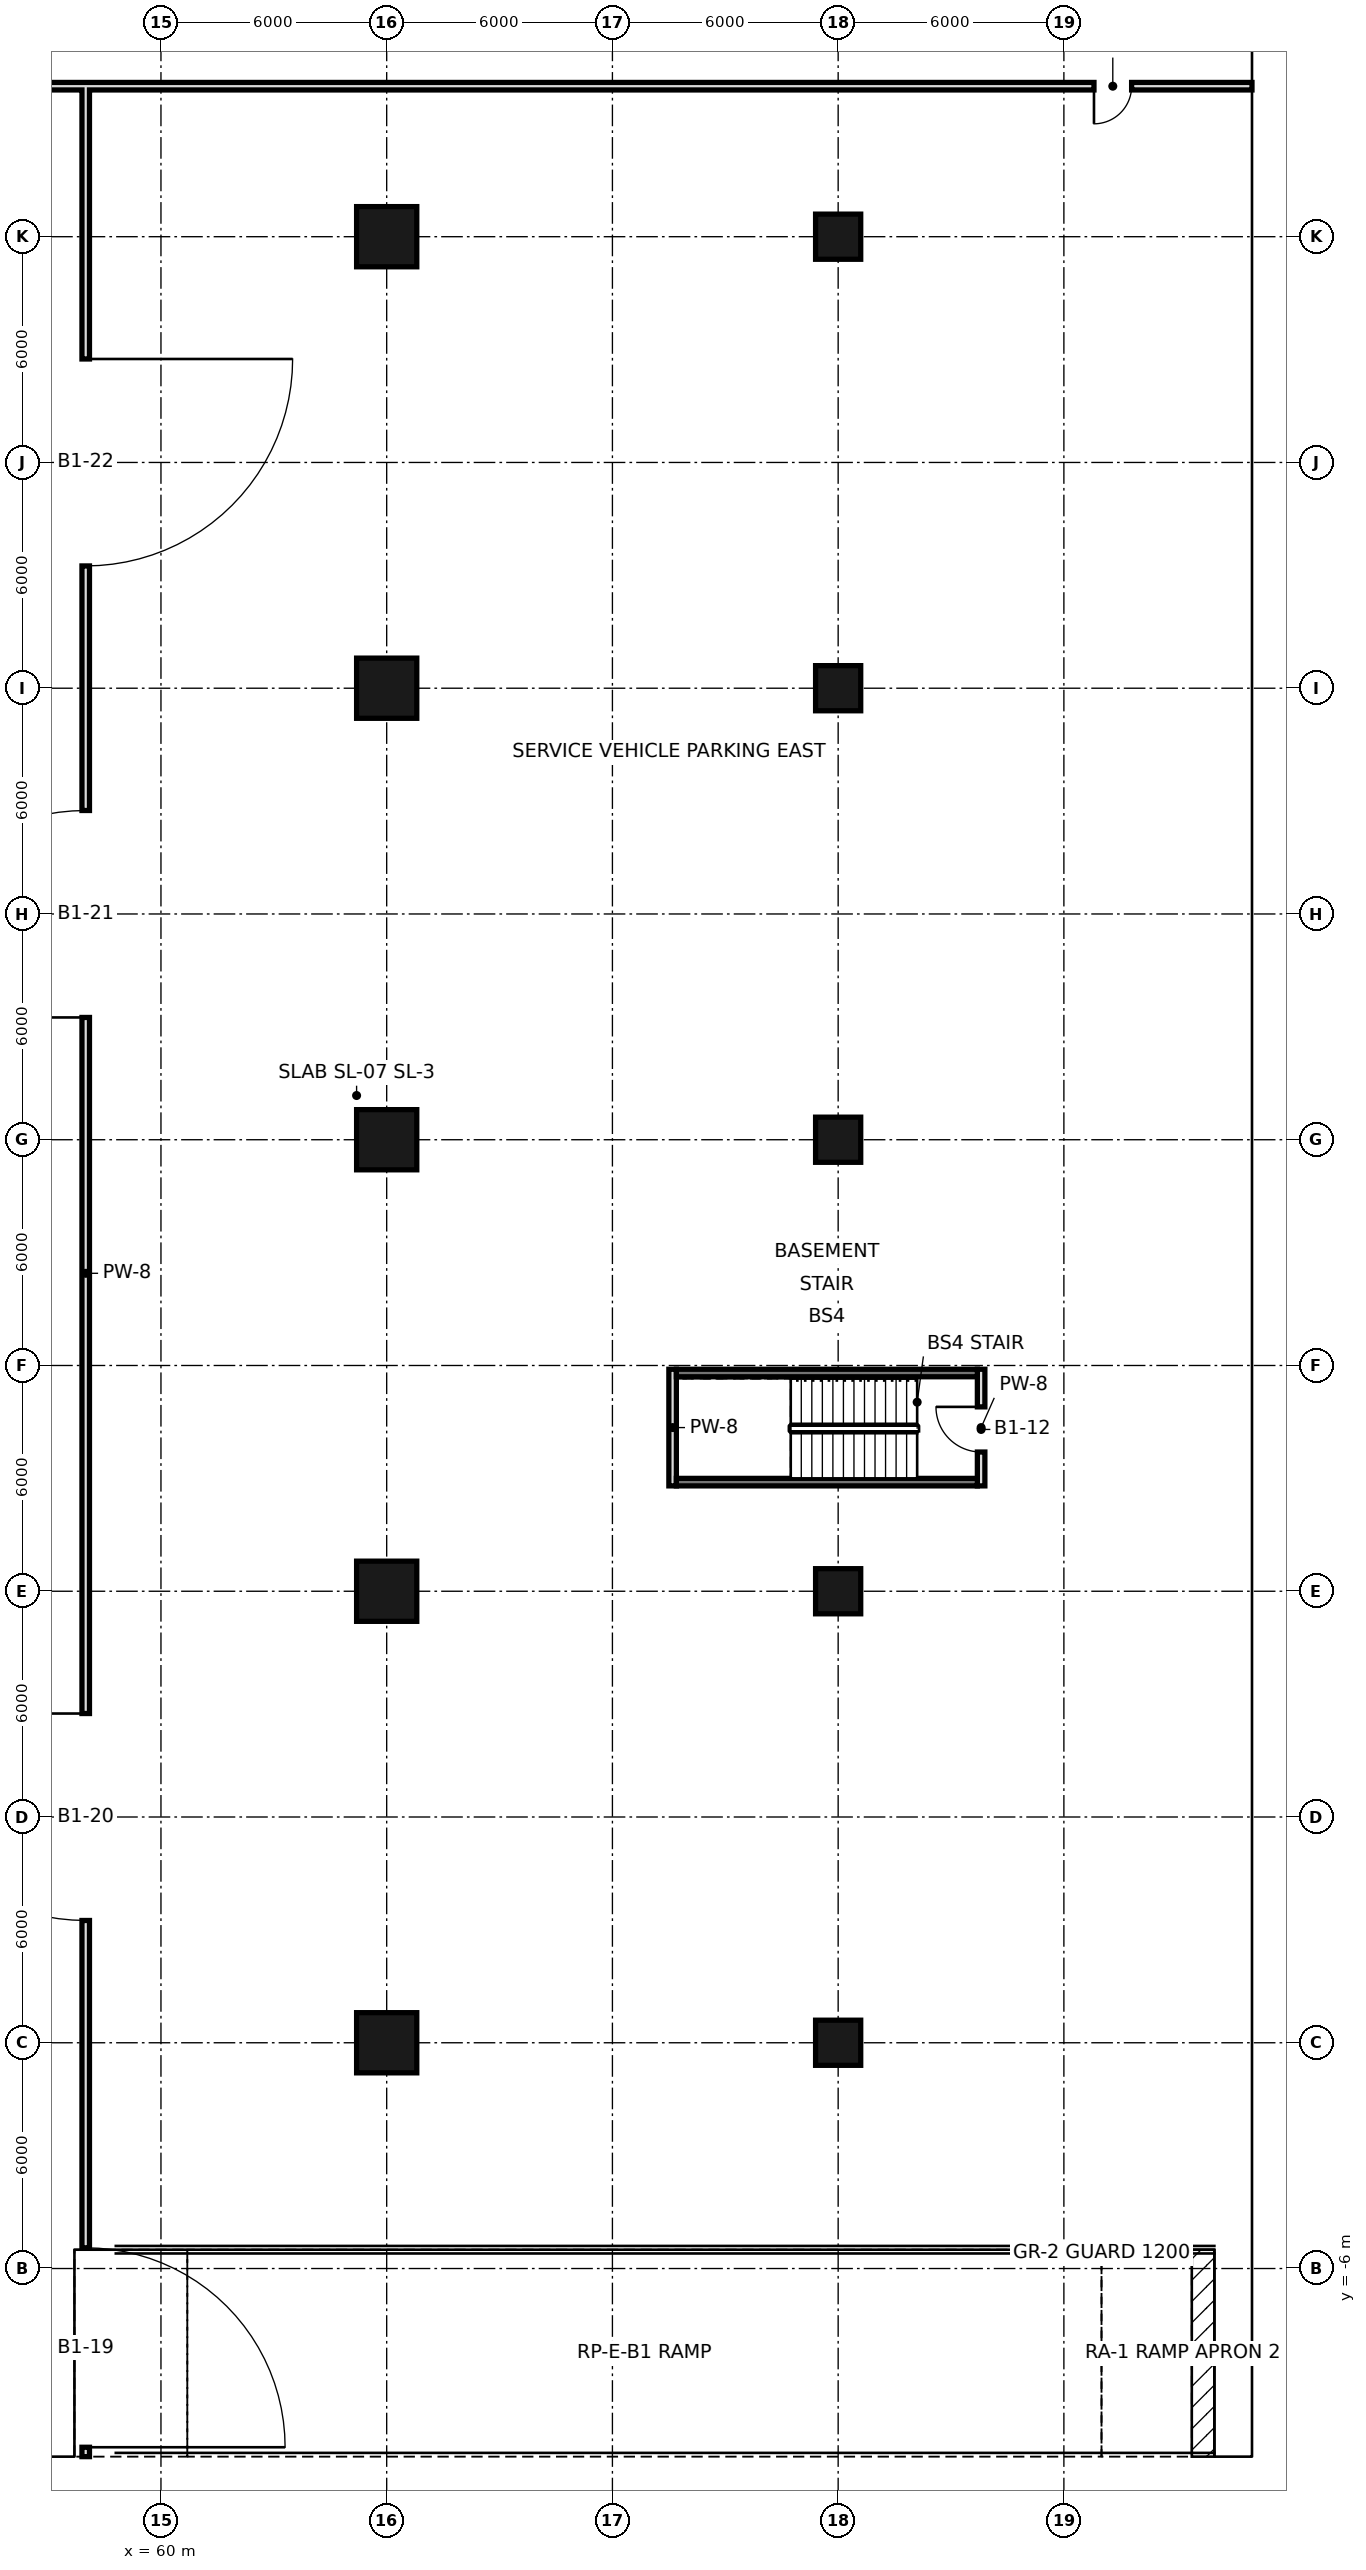
"""IFC4 building model, lengths in metres.
Left out: names, types, materials, properties, quantities, classifications, styles, units other than length and angle.
Written with IfcOpenShell. Run it as: python <this file> out.ifc"""

import sys

from ifc_helpers import new_model, si_unit, direction, frame, frame_2d, origin, origin_2d, place, context, subcontext, project, spatial, rectangle, extrude, element, fill, save


model = new_model("IFC4")
c1 = context("Model", 3, precision=1e-05, world=origin(), true_north=direction((0.0, 1.0)))
c2 = subcontext(c1, "Body", "Model", "MODEL_VIEW")
j1 = project(units=[si_unit("LENGTHUNIT", "METRE"), si_unit("PLANEANGLEUNIT", "RADIAN")], contexts=[c1])
p1 = place(None, origin())
s1 = spatial("IfcSite", under=j1, at=p1, CompositionType="ELEMENT")
p2 = place(p1, origin())
s2 = spatial("IfcBuilding", under=s1, at=p2, CompositionType="ELEMENT")
p3 = place(p2, frame((0.0, 0.0, -13.5)))
s3 = spatial("IfcBuildingStorey", under=s2, at=p3, CompositionType="ELEMENT", Elevation=-13.5)
p4 = place(p3, frame((89.5, -12.0, -26.5), z_axis=(0.0, 0.0, 1.0), x_axis=(0.0, 1.0, 0.0)))
e1 = element("IfcWall", 1, at=p4, inside=s3, PredefinedType="SOLIDWALL", context=c2, shape_type="SweptSolid", body=[
    extrude(rectangle(XDim=72.0, YDim=1.0, at=frame_2d((36.0, 0.0))), origin(), (0.0, 0.0, 1.0), 39.64),
])
p5 = place(p3, frame((-23.0, -11.5, -26.5), z_axis=(0.0, 0.0, 1.0), x_axis=(1.0, 0.0, 0.0)))
e2 = element("IfcWall", 2, at=p5, inside=s3, PredefinedType="SOLIDWALL", context=c2, shape_type="SweptSolid", body=[
    extrude(rectangle(XDim=112.0, YDim=1.0, at=frame_2d((56.0, 0.0))), origin(), (0.0, 0.0, 1.0), 39.64),
])
p6 = place(p2, frame((0.0, 0.0, -4.5)))
s4 = spatial("IfcBuildingStorey", under=s2, at=p6, CompositionType="ELEMENT", Elevation=-4.5)
for number, where, z_axis, x_axis in (
    (3, (66.0, 0.0, 0.0), (0.0, 0.0, 1.0), (1.0, 0.0, 0.0)),
    (4, (66.0, 12.0, 0.0), (0.0, 0.0, 1.0), (1.0, 0.0, 0.0)),
    (5, (66.0, 24.0, 0.0), (0.0, 0.0, 1.0), (1.0, 0.0, 0.0)),
    (6, (66.0, 36.0, 0.0), (0.0, 0.0, 1.0), (1.0, 0.0, 0.0)),
    (7, (66.0, 48.0, 0.0), (0.0, 0.0, 1.0), (1.0, 0.0, 0.0)),
):
    element("IfcColumn", number, at=place(p6, frame(where, z_axis=z_axis, x_axis=x_axis)), inside=s4, PredefinedType="COLUMN", context=c2, shape_type="SweptSolid", body=[
        extrude(rectangle(XDim=1.6, YDim=1.6, at=origin_2d()), origin(), (0.0, 0.0, 1.0), 4.5),
    ])
for number, where, z_axis, x_axis in (
    (8, (78.0, 0.0, 0.0), (0.0, 0.0, 1.0), (1.0, 0.0, 0.0)),
    (9, (78.0, 12.0, 0.0), (0.0, 0.0, 1.0), (1.0, 0.0, 0.0)),
    (10, (78.0, 24.0, 0.0), (0.0, 0.0, 1.0), (1.0, 0.0, 0.0)),
    (11, (78.0, 36.0, 0.0), (0.0, 0.0, 1.0), (1.0, 0.0, 0.0)),
    (12, (78.0, 48.0, 0.0), (0.0, 0.0, 1.0), (1.0, 0.0, 0.0)),
):
    element("IfcColumn", number, at=place(p6, frame(where, z_axis=z_axis, x_axis=x_axis)), inside=s4, PredefinedType="COLUMN", context=c2, shape_type="SweptSolid", body=[
        extrude(rectangle(XDim=1.2, YDim=1.2, at=origin_2d()), origin(), (0.0, 0.0, 1.0), 4.5),
    ])
p7 = place(p6, frame((58.0, -11.0, 0.0), z_axis=(0.0, 0.0, 1.0), x_axis=(0.0, 1.0, 0.0)))
e13 = element("IfcWall", 13, at=p7, inside=s4, PredefinedType="SOLIDWALL", context=c2, shape_type="SweptSolid", body=[
    extrude(rectangle(XDim=62.9, YDim=0.2, at=frame_2d((31.45, 0.0))), origin(), (0.0, 0.0, 1.0), 3.04),
])
p8 = place(p7, frame((0.25, 0.0, 0.0)))
e14 = element("IfcOpeningElement", 14, at=p8, cuts=e13, PredefinedType="OPENING", context=c2, shape_type="SweptSolid", body=[
    extrude(rectangle(XDim=5.3, YDim=2.4, at=frame_2d((2.65, 1.2))), frame((0.0, 0.11, 0.0), z_axis=(0.0, -1.0, 0.0), x_axis=(1.0, 0.0, 0.0)), (0.0, 0.0, 1.0), 0.22),
])
p9 = place(p7, frame((14.25, 0.0, 0.0)))
e15 = element("IfcOpeningElement", 15, at=p9, cuts=e13, PredefinedType="OPENING", context=c2, shape_type="SweptSolid", body=[
    extrude(rectangle(XDim=5.5, YDim=2.4, at=frame_2d((2.75, 1.2))), frame((0.0, 0.11, 0.0), z_axis=(0.0, -1.0, 0.0), x_axis=(1.0, 0.0, 0.0)), (0.0, 0.0, 1.0), 0.22),
])
p10 = place(p7, frame((38.25, 0.0, 0.0)))
e16 = element("IfcOpeningElement", 16, at=p10, cuts=e13, PredefinedType="OPENING", context=c2, shape_type="SweptSolid", body=[
    extrude(rectangle(XDim=5.5, YDim=2.4, at=frame_2d((2.75, 1.2))), frame((0.0, 0.11, 0.0), z_axis=(0.0, -1.0, 0.0), x_axis=(1.0, 0.0, 0.0)), (0.0, 0.0, 1.0), 0.22),
])
p11 = place(p7, frame((50.25, 0.0, 0.0)))
e17 = element("IfcOpeningElement", 17, at=p11, cuts=e13, PredefinedType="OPENING", context=c2, shape_type="SweptSolid", body=[
    extrude(rectangle(XDim=5.5, YDim=2.4, at=frame_2d((2.75, 1.2))), frame((0.0, 0.11, 0.0), z_axis=(0.0, -1.0, 0.0), x_axis=(1.0, 0.0, 0.0)), (0.0, 0.0, 1.0), 0.22),
])
p12 = place(p6, frame((73.6, 14.8, 0.0), z_axis=(0.0, 0.0, 1.0), x_axis=(0.0, 1.0, 0.0)))
e18 = element("IfcWall", 18, at=p12, inside=s4, PredefinedType="SOLIDWALL", context=c2, shape_type="SweptSolid", body=[
    extrude(rectangle(XDim=3.1, YDim=0.2, at=frame_2d((1.55, 0.0))), origin(), (0.0, 0.0, 1.0), 4.14),
])
p13 = place(p6, frame((81.8, 14.8, 0.0), z_axis=(0.0, 0.0, 1.0), x_axis=(0.0, 1.0, 0.0)))
e19 = element("IfcWall", 19, at=p13, inside=s4, PredefinedType="SOLIDWALL", context=c2, shape_type="SweptSolid", body=[
    extrude(rectangle(XDim=3.1, YDim=0.2, at=frame_2d((1.55, 0.0))), origin(), (0.0, 0.0, 1.0), 4.14),
])
p14 = place(p13, frame((0.9, 0.0, 0.0)))
e20 = element("IfcOpeningElement", 20, at=p14, cuts=e19, PredefinedType="OPENING", context=c2, shape_type="SweptSolid", body=[
    extrude(rectangle(XDim=1.2, YDim=2.4, at=frame_2d((0.6, 1.2))), frame((0.0, 0.11, 0.0), z_axis=(0.0, -1.0, 0.0), x_axis=(1.0, 0.0, 0.0)), (0.0, 0.0, 1.0), 0.22),
])
for number, where, z_axis, x_axis in (
    (21, (73.7, 14.9, 0.0), (0.0, 0.0, 1.0), (1.0, 0.0, 0.0)),
    (22, (73.7, 17.8, 0.0), (0.0, 0.0, 1.0), (1.0, 0.0, 0.0)),
):
    element("IfcWall", number, at=place(p6, frame(where, z_axis=z_axis, x_axis=x_axis)), inside=s4, PredefinedType="SOLIDWALL", context=c2, shape_type="SweptSolid", body=[
        extrude(rectangle(XDim=8.0, YDim=0.2, at=frame_2d((4.0, 0.0))), origin(), (0.0, 0.0, 1.0), 4.14),
    ])
p15 = place(p6, frame((-23.0, 52.0, 0.0), z_axis=(0.0, 0.0, 1.0), x_axis=(1.0, 0.0, 0.0)))
e23 = element("IfcWall", 23, at=p15, inside=s4, PredefinedType="SOLIDWALL", context=c2, shape_type="SweptSolid", body=[
    extrude(rectangle(XDim=112.0, YDim=0.2, at=frame_2d((56.0, 0.0))), origin(), (0.0, 0.0, 1.0), 4.14),
])
p16 = place(p15, frame((3.25, 0.0, 0.0)))
e24 = element("IfcOpeningElement", 24, at=p16, cuts=e23, PredefinedType="OPENING", context=c2, shape_type="SweptSolid", body=[
    extrude(rectangle(XDim=1.0, YDim=2.4, at=frame_2d((0.5, 1.2))), frame((0.0, 0.11, 0.0), z_axis=(0.0, -1.0, 0.0), x_axis=(1.0, 0.0, 0.0)), (0.0, 0.0, 1.0), 0.22),
])
p17 = place(p15, frame((107.8, 0.0, 0.0)))
e25 = element("IfcOpeningElement", 25, at=p17, cuts=e23, PredefinedType="OPENING", context=c2, shape_type="SweptSolid", body=[
    extrude(rectangle(XDim=1.0, YDim=2.4, at=frame_2d((0.5, 1.2))), frame((0.0, 0.11, 0.0), z_axis=(0.0, -1.0, 0.0), x_axis=(1.0, 0.0, 0.0)), (0.0, 0.0, 1.0), 0.22),
])
p18 = place(p14, frame((1.2, 0.0, 0.0), z_axis=(0.0, 0.0, 1.0), x_axis=(-1.0, 0.0, 0.0)))
e26 = element("IfcDoor", 26, at=p18, inside=s4, OperationType="SINGLE_SWING_LEFT", PredefinedType="DOOR", context=c2, shape_type="SweptSolid", body=[
    extrude(rectangle(XDim=1.2, YDim=2.4, at=frame_2d((0.6, 1.2))), frame((0.0, 0.025, 0.0), z_axis=(0.0, -1.0, 0.0), x_axis=(1.0, 0.0, 0.0)), (0.0, 0.0, 1.0), 0.05),
])
fill(e20, e26)
p19 = place(p17, frame((1.0, 0.0, 0.0), z_axis=(0.0, 0.0, 1.0), x_axis=(-1.0, 0.0, 0.0)))
e27 = element("IfcDoor", 27, at=p19, inside=s4, OperationType="SINGLE_SWING_RIGHT", PredefinedType="DOOR", context=c2, shape_type="SweptSolid", body=[
    extrude(rectangle(XDim=1.0, YDim=2.4, at=frame_2d((0.5, 1.2))), frame((0.0, 0.025, 0.0), z_axis=(0.0, -1.0, 0.0), x_axis=(1.0, 0.0, 0.0)), (0.0, 0.0, 1.0), 0.05),
])
fill(e25, e27)
p20 = place(p8, frame((5.3, 0.0, 0.0), z_axis=(0.0, 0.0, 1.0), x_axis=(-1.0, 0.0, 0.0)))
e28 = element("IfcDoor", 28, at=p20, inside=s4, OperationType="SINGLE_SWING_RIGHT", PredefinedType="DOOR", context=c2, shape_type="SweptSolid", body=[
    extrude(rectangle(XDim=5.3, YDim=2.4, at=frame_2d((2.65, 1.2))), frame((0.0, 0.025, 0.0), z_axis=(0.0, -1.0, 0.0), x_axis=(1.0, 0.0, 0.0)), (0.0, 0.0, 1.0), 0.05),
])
fill(e14, e28)
p21 = place(p9, frame((5.5, 0.0, 0.0), z_axis=(0.0, 0.0, 1.0), x_axis=(-1.0, 0.0, 0.0)))
e29 = element("IfcDoor", 29, at=p21, inside=s4, OperationType="SINGLE_SWING_LEFT", PredefinedType="DOOR", context=c2, shape_type="SweptSolid", body=[
    extrude(rectangle(XDim=5.5, YDim=2.4, at=frame_2d((2.75, 1.2))), frame((0.0, 0.025, 0.0), z_axis=(0.0, -1.0, 0.0), x_axis=(1.0, 0.0, 0.0)), (0.0, 0.0, 1.0), 0.05),
])
fill(e15, e29)
p22 = place(p10, origin())
e30 = element("IfcDoor", 30, at=p22, inside=s4, OperationType="SINGLE_SWING_LEFT", PredefinedType="DOOR", context=c2, shape_type="SweptSolid", body=[
    extrude(rectangle(XDim=5.5, YDim=2.4, at=frame_2d((2.75, 1.2))), frame((0.0, 0.025, 0.0), z_axis=(0.0, -1.0, 0.0), x_axis=(1.0, 0.0, 0.0)), (0.0, 0.0, 1.0), 0.05),
])
fill(e16, e30)
p23 = place(p11, origin())
e31 = element("IfcDoor", 31, at=p23, inside=s4, OperationType="SINGLE_SWING_RIGHT", PredefinedType="DOOR", context=c2, shape_type="SweptSolid", body=[
    extrude(rectangle(XDim=5.5, YDim=2.4, at=frame_2d((2.75, 1.2))), frame((0.0, 0.025, 0.0), z_axis=(0.0, -1.0, 0.0), x_axis=(1.0, 0.0, 0.0)), (0.0, 0.0, 1.0), 0.05),
])
fill(e17, e31)
save(model, sys.argv[1])
